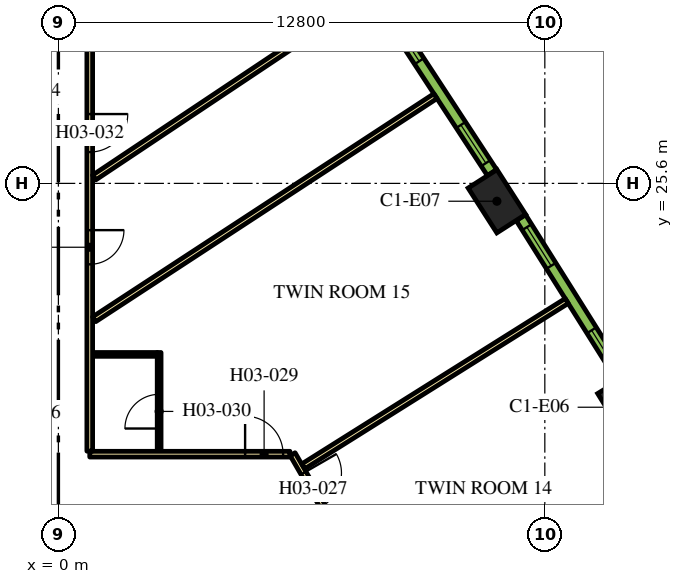
"""IFC4 building model, lengths in metres.
Left out: names, types, materials, properties, quantities, classifications, styles, units other than length and angle.
Written with IfcOpenShell. Run it as: python <this file> out.ifc"""

import sys

from ifc_helpers import new_model, si_unit, direction, frame, frame_2d, origin, origin_2d, place, context, subcontext, project, spatial, rectangle, extrude, element, fill, save


model = new_model("IFC4")
c1 = context("Model", 3, precision=1e-05, world=origin(), true_north=direction((0.0, 1.0)))
c2 = subcontext(c1, "Body", "Model", "MODEL_VIEW")
j1 = project(units=[si_unit("LENGTHUNIT", "METRE"), si_unit("PLANEANGLEUNIT", "RADIAN")], contexts=[c1])
p1 = place(None, origin())
s1 = spatial("IfcSite", under=j1, at=p1, CompositionType="ELEMENT")
p2 = place(p1, origin())
s2 = spatial("IfcBuilding", under=s1, at=p2, CompositionType="ELEMENT")
p3 = place(p2, frame((0.0, 0.0, 54.9)))
s3 = spatial("IfcBuildingStorey", under=s2, at=p3, CompositionType="ELEMENT", Elevation=54.9)
for number, where, z_axis, x_axis in (
    (1, (14.942, 19.71, 0.0), (0.0, 0.0, 1.0), (-0.524, 0.852, 0.0)),
    (2, (11.539, 25.131, 0.0), (0.0, 0.0, 1.0), (-0.539, 0.842, 0.0)),
):
    element("IfcColumn", number, at=place(p3, frame(where, z_axis=z_axis, x_axis=x_axis)), inside=s3, PredefinedType="COLUMN", context=c2, shape_type="SweptSolid", body=[
        extrude(rectangle(XDim=1.4, YDim=0.9, at=origin_2d()), origin(), (0.0, 0.0, 1.0), 3.9),
    ])
p4 = place(p3, frame((6.163, 18.475, 0.0), z_axis=(0.0, 0.0, 1.0), x_axis=(0.500001317485, -0.866024643133, 0.0)))
e3 = element("IfcWall", 3, at=p4, inside=s3, PredefinedType="PARTITIONING", context=c2, shape_type="SweptSolid", body=[
    extrude(rectangle(XDim=25.767, YDim=0.15, at=frame_2d((12.883, 0.0))), origin(), (0.0, 0.0, 1.0), 2.75),
])
p5 = place(p4, frame((24.586, 0.0, 0.0)))
e4 = element("IfcOpeningElement", 4, at=p5, cuts=e3, PredefinedType="OPENING", context=c2, shape_type="SweptSolid", body=[
    extrude(rectangle(XDim=1.0, YDim=2.1, at=frame_2d((0.5, 1.05))), frame((0.0, 0.085, 0.0), z_axis=(0.0, -1.0, 0.0), x_axis=(1.0, 0.0, 0.0)), (0.0, 0.0, 1.0), 0.17),
])
p6 = place(p4, frame((13.144, 0.0, 0.0)))
e5 = element("IfcOpeningElement", 5, at=p6, cuts=e3, PredefinedType="OPENING", context=c2, shape_type="SweptSolid", body=[
    extrude(rectangle(XDim=1.0, YDim=2.1, at=frame_2d((0.5, 1.05))), frame((0.0, 0.085, 0.0), z_axis=(0.0, -1.0, 0.0), x_axis=(1.0, 0.0, 0.0)), (0.0, 0.0, 1.0), 0.17),
])
p7 = place(p4, frame((11.692, 0.0, 0.0)))
e6 = element("IfcOpeningElement", 6, at=p7, cuts=e3, PredefinedType="OPENING", context=c2, shape_type="SweptSolid", body=[
    extrude(rectangle(XDim=1.0, YDim=2.1, at=frame_2d((0.5, 1.05))), frame((0.0, 0.085, 0.0), z_axis=(0.0, -1.0, 0.0), x_axis=(1.0, 0.0, 0.0)), (0.0, 0.0, 1.0), 0.17),
])
p8 = place(p4, frame((0.572, 0.0, 0.0)))
e7 = element("IfcOpeningElement", 7, at=p8, cuts=e3, PredefinedType="OPENING", context=c2, shape_type="SweptSolid", body=[
    extrude(rectangle(XDim=1.0, YDim=2.1, at=frame_2d((0.5, 1.05))), frame((0.0, 0.085, 0.0), z_axis=(0.0, -1.0, 0.0), x_axis=(1.0, 0.0, 0.0)), (0.0, 0.0, 1.0), 0.17),
])
p9 = place(p3, frame((0.825, 18.475, 0.0), z_axis=(0.0, 0.0, 1.0), x_axis=(1.0, 0.0, 0.0)))
e8 = element("IfcWall", 8, at=p9, inside=s3, PredefinedType="PARTITIONING", context=c2, shape_type="SweptSolid", body=[
    extrude(rectangle(XDim=5.268, YDim=0.15, at=frame_2d((2.634, 0.0))), origin(), (0.0, 0.0, 1.0), 2.75),
])
p10 = place(p9, frame((4.088, 0.0, 0.0)))
e9 = element("IfcOpeningElement", 9, at=p10, cuts=e8, PredefinedType="OPENING", context=c2, shape_type="SweptSolid", body=[
    extrude(rectangle(XDim=1.0, YDim=2.1, at=frame_2d((0.5, 1.05))), frame((0.0, 0.085, 0.0), z_axis=(0.0, -1.0, 0.0), x_axis=(1.0, 0.0, 0.0)), (0.0, 0.0, 1.0), 0.17),
])
p11 = place(p3, frame((0.825, 34.699, 0.0), z_axis=(0.0, 0.0, 1.0), x_axis=(0.0, -1.0, 0.0)))
e10 = element("IfcWall", 10, at=p11, inside=s3, PredefinedType="PARTITIONING", context=c2, shape_type="SweptSolid", body=[
    extrude(rectangle(XDim=16.144, YDim=0.15, at=frame_2d((8.072, 0.0))), origin(), (0.0, 0.0, 1.0), 2.75),
])
p12 = place(p11, frame((10.329, 0.0, 0.0)))
e11 = element("IfcOpeningElement", 11, at=p12, cuts=e10, PredefinedType="OPENING", context=c2, shape_type="SweptSolid", body=[
    extrude(rectangle(XDim=0.9, YDim=2.1, at=frame_2d((0.45, 1.05))), frame((0.0, 0.085, 0.0), z_axis=(0.0, -1.0, 0.0), x_axis=(1.0, 0.0, 0.0)), (0.0, 0.0, 1.0), 0.17),
])
p13 = place(p11, frame((7.275, 0.0, 0.0)))
e12 = element("IfcOpeningElement", 12, at=p13, cuts=e10, PredefinedType="OPENING", context=c2, shape_type="SweptSolid", body=[
    extrude(rectangle(XDim=1.0, YDim=2.1, at=frame_2d((0.5, 1.05))), frame((0.0, 0.085, 0.0), z_axis=(0.0, -1.0, 0.0), x_axis=(1.0, 0.0, 0.0)), (0.0, 0.0, 1.0), 0.17),
])
p14 = place(p3, frame((9.922, 27.896, 0.0), z_axis=(0.0, 0.0, 1.0), x_axis=(-0.836970816595, -0.547247523675, 0.0)))
e13 = element("IfcWall", 13, at=p14, inside=s3, PredefinedType="PARTITIONING", context=c2, shape_type="SweptSolid", body=[
    extrude(rectangle(XDim=10.729, YDim=0.15, at=frame_2d((5.364, 0.0))), origin(), (0.0, 0.0, 1.0), 2.75),
])
p15 = place(p3, frame((7.662, 30.238, 0.0), z_axis=(0.0, 0.0, 1.0), x_axis=(-0.831882886825, -0.554951225431, 0.0)))
e14 = element("IfcWall", 14, at=p15, inside=s3, PredefinedType="PARTITIONING", context=c2, shape_type="SweptSolid", body=[
    extrude(rectangle(XDim=8.079, YDim=0.15, at=frame_2d((4.04, 0.0))), origin(), (0.0, 0.0, 1.0), 2.75),
])
p16 = place(p3, frame((13.376, 22.506, 0.0), z_axis=(0.0, 0.0, 1.0), x_axis=(-0.846945608893, -0.531679542183, 0.0)))
e15 = element("IfcWall", 15, at=p16, inside=s3, PredefinedType="PARTITIONING", context=c2, shape_type="SweptSolid", body=[
    extrude(rectangle(XDim=8.182, YDim=0.15, at=frame_2d((4.091, 0.0))), origin(), (0.0, 0.0, 1.0), 2.75),
])
p17 = place(p3, frame((2.651, 18.55, 0.0), z_axis=(0.0, 0.0, 1.0), x_axis=(0.0, 1.0, 0.0)))
e16 = element("IfcWall", 16, at=p17, inside=s3, PredefinedType="PARTITIONING", context=c2, shape_type="SweptSolid", body=[
    extrude(rectangle(XDim=2.6, YDim=0.1, at=frame_2d((1.3, 0.0))), origin(), (0.0, 0.0, 1.0), 2.75),
])
p18 = place(p17, frame((0.6, 0.0, 0.0)))
e17 = element("IfcOpeningElement", 17, at=p18, cuts=e16, PredefinedType="OPENING", context=c2, shape_type="SweptSolid", body=[
    extrude(rectangle(XDim=0.9, YDim=2.1, at=frame_2d((0.45, 1.05))), frame((0.0, 0.06, 0.0), z_axis=(0.0, -1.0, 0.0), x_axis=(1.0, 0.0, 0.0)), (0.0, 0.0, 1.0), 0.12),
])
p19 = place(p3, frame((2.601, 21.1, 0.0), z_axis=(0.0, 0.0, 1.0), x_axis=(-1.0, 0.0, 0.0)))
e18 = element("IfcWall", 18, at=p19, inside=s3, PredefinedType="PARTITIONING", context=c2, shape_type="SweptSolid", body=[
    extrude(rectangle(XDim=1.7, YDim=0.1, at=frame_2d((0.85, 0.0))), origin(), (0.0, 0.0, 1.0), 2.75),
])
p20 = place(p3, frame((14.827, 20.466, 0.0), z_axis=(0.0, 0.0, 1.0), x_axis=(-0.531688286542, 0.846940119462, 0.0)))
e19 = element("IfcWall", 19, at=p20, inside=s3, PredefinedType="SOLIDWALL", context=c2, shape_type="SweptSolid", body=[
    extrude(rectangle(XDim=4.998, YDim=0.29, at=frame_2d((2.499, 0.0))), origin(), (0.0, 0.0, 1.0), 3.65),
])
p21 = place(p20, frame((0.297, 0.0, 0.9)))
e20 = element("IfcOpeningElement", 20, at=p21, cuts=e19, PredefinedType="OPENING", context=c2, shape_type="SweptSolid", body=[
    extrude(rectangle(XDim=1.2, YDim=2.15, at=frame_2d((0.6, 1.075))), frame((0.0, 0.155, 0.0), z_axis=(0.0, -1.0, 0.0), x_axis=(1.0, 0.0, 0.0)), (0.0, 0.0, 1.0), 0.31),
])
p22 = place(p20, frame((3.501, 0.0, 0.9)))
e21 = element("IfcOpeningElement", 21, at=p22, cuts=e19, PredefinedType="OPENING", context=c2, shape_type="SweptSolid", body=[
    extrude(rectangle(XDim=1.2, YDim=2.15, at=frame_2d((0.6, 1.075))), frame((0.0, 0.155, 0.0), z_axis=(0.0, -1.0, 0.0), x_axis=(1.0, 0.0, 0.0)), (0.0, 0.0, 1.0), 0.31),
])
p23 = place(p3, frame((11.411, 25.884, 0.0), z_axis=(0.0, 0.0, 1.0), x_axis=(-0.547204617628, 0.836998868845, 0.0)))
e22 = element("IfcWall", 22, at=p23, inside=s3, PredefinedType="SOLIDWALL", context=c2, shape_type="SweptSolid", body=[
    extrude(rectangle(XDim=4.998, YDim=0.29, at=frame_2d((2.499, 0.0))), origin(), (0.0, 0.0, 1.0), 3.65),
])
p24 = place(p23, frame((0.297, 0.0, 0.9)))
e23 = element("IfcOpeningElement", 23, at=p24, cuts=e22, PredefinedType="OPENING", context=c2, shape_type="SweptSolid", body=[
    extrude(rectangle(XDim=1.2, YDim=2.15, at=frame_2d((0.6, 1.075))), frame((0.0, 0.155, 0.0), z_axis=(0.0, -1.0, 0.0), x_axis=(1.0, 0.0, 0.0)), (0.0, 0.0, 1.0), 0.31),
])
p25 = place(p23, frame((3.501, 0.0, 0.9)))
e24 = element("IfcOpeningElement", 24, at=p25, cuts=e22, PredefinedType="OPENING", context=c2, shape_type="SweptSolid", body=[
    extrude(rectangle(XDim=1.2, YDim=2.15, at=frame_2d((0.6, 1.075))), frame((0.0, 0.155, 0.0), z_axis=(0.0, -1.0, 0.0), x_axis=(1.0, 0.0, 0.0)), (0.0, 0.0, 1.0), 0.31),
])
p26 = place(p8, origin())
e25 = element("IfcDoor", 25, at=p26, inside=s3, OperationType="SINGLE_SWING_LEFT", PredefinedType="DOOR", context=c2, shape_type="SweptSolid", body=[
    extrude(rectangle(XDim=1.0, YDim=2.1, at=frame_2d((0.5, 1.05))), frame((0.0, 0.025, 0.0), z_axis=(0.0, -1.0, 0.0), x_axis=(1.0, 0.0, 0.0)), (0.0, 0.0, 1.0), 0.05),
])
fill(e7, e25)
p27 = place(p10, origin())
e26 = element("IfcDoor", 26, at=p27, inside=s3, OperationType="SINGLE_SWING_RIGHT", PredefinedType="DOOR", context=c2, shape_type="SweptSolid", body=[
    extrude(rectangle(XDim=1.0, YDim=2.1, at=frame_2d((0.5, 1.05))), frame((0.0, 0.025, 0.0), z_axis=(0.0, -1.0, 0.0), x_axis=(1.0, 0.0, 0.0)), (0.0, 0.0, 1.0), 0.05),
])
fill(e9, e26)
p28 = place(p18, origin())
e27 = element("IfcDoor", 27, at=p28, inside=s3, OperationType="SINGLE_SWING_RIGHT", PredefinedType="DOOR", context=c2, shape_type="SweptSolid", body=[
    extrude(rectangle(XDim=0.9, YDim=2.1, at=frame_2d((0.45, 1.05))), frame((0.0, 0.025, 0.0), z_axis=(0.0, -1.0, 0.0), x_axis=(1.0, 0.0, 0.0)), (0.0, 0.0, 1.0), 0.05),
])
fill(e17, e27)
p29 = place(p12, origin())
e28 = element("IfcDoor", 28, at=p29, inside=s3, OperationType="SINGLE_SWING_RIGHT", PredefinedType="DOOR", context=c2, shape_type="SweptSolid", body=[
    extrude(rectangle(XDim=0.9, YDim=2.1, at=frame_2d((0.45, 1.05))), frame((0.0, 0.025, 0.0), z_axis=(0.0, -1.0, 0.0), x_axis=(1.0, 0.0, 0.0)), (0.0, 0.0, 1.0), 0.05),
])
fill(e11, e28)
p30 = place(p13, origin())
e29 = element("IfcDoor", 29, at=p30, inside=s3, OperationType="SINGLE_SWING_RIGHT", PredefinedType="DOOR", context=c2, shape_type="SweptSolid", body=[
    extrude(rectangle(XDim=1.0, YDim=2.1, at=frame_2d((0.5, 1.05))), frame((0.0, 0.025, 0.0), z_axis=(0.0, -1.0, 0.0), x_axis=(1.0, 0.0, 0.0)), (0.0, 0.0, 1.0), 0.05),
])
fill(e12, e29)
p31 = place(p21, origin())
e30 = element("IfcWindow", 30, at=p31, inside=s3, PartitioningType="DOUBLE_PANEL_VERTICAL", PredefinedType="WINDOW", context=c2, shape_type="SweptSolid", body=[
    extrude(rectangle(XDim=1.2, YDim=2.15, at=frame_2d((0.6, 1.075))), frame((0.0, 0.015, 0.0), z_axis=(0.0, -1.0, 0.0), x_axis=(1.0, 0.0, 0.0)), (0.0, 0.0, 1.0), 0.06),
])
fill(e20, e30)
p32 = place(p22, origin())
e31 = element("IfcWindow", 31, at=p32, inside=s3, PartitioningType="DOUBLE_PANEL_VERTICAL", PredefinedType="WINDOW", context=c2, shape_type="SweptSolid", body=[
    extrude(rectangle(XDim=1.2, YDim=2.15, at=frame_2d((0.6, 1.075))), frame((0.0, 0.015, 0.0), z_axis=(0.0, -1.0, 0.0), x_axis=(1.0, 0.0, 0.0)), (0.0, 0.0, 1.0), 0.06),
])
fill(e21, e31)
p33 = place(p24, origin())
e32 = element("IfcWindow", 32, at=p33, inside=s3, PartitioningType="DOUBLE_PANEL_VERTICAL", PredefinedType="WINDOW", context=c2, shape_type="SweptSolid", body=[
    extrude(rectangle(XDim=1.2, YDim=2.15, at=frame_2d((0.6, 1.075))), frame((0.0, 0.015, 0.0), z_axis=(0.0, -1.0, 0.0), x_axis=(1.0, 0.0, 0.0)), (0.0, 0.0, 1.0), 0.06),
])
fill(e23, e32)
p34 = place(p25, origin())
e33 = element("IfcWindow", 33, at=p34, inside=s3, PartitioningType="DOUBLE_PANEL_VERTICAL", PredefinedType="WINDOW", context=c2, shape_type="SweptSolid", body=[
    extrude(rectangle(XDim=1.2, YDim=2.15, at=frame_2d((0.6, 1.075))), frame((0.0, 0.015, 0.0), z_axis=(0.0, -1.0, 0.0), x_axis=(1.0, 0.0, 0.0)), (0.0, 0.0, 1.0), 0.06),
])
fill(e24, e33)
save(model, sys.argv[1])
